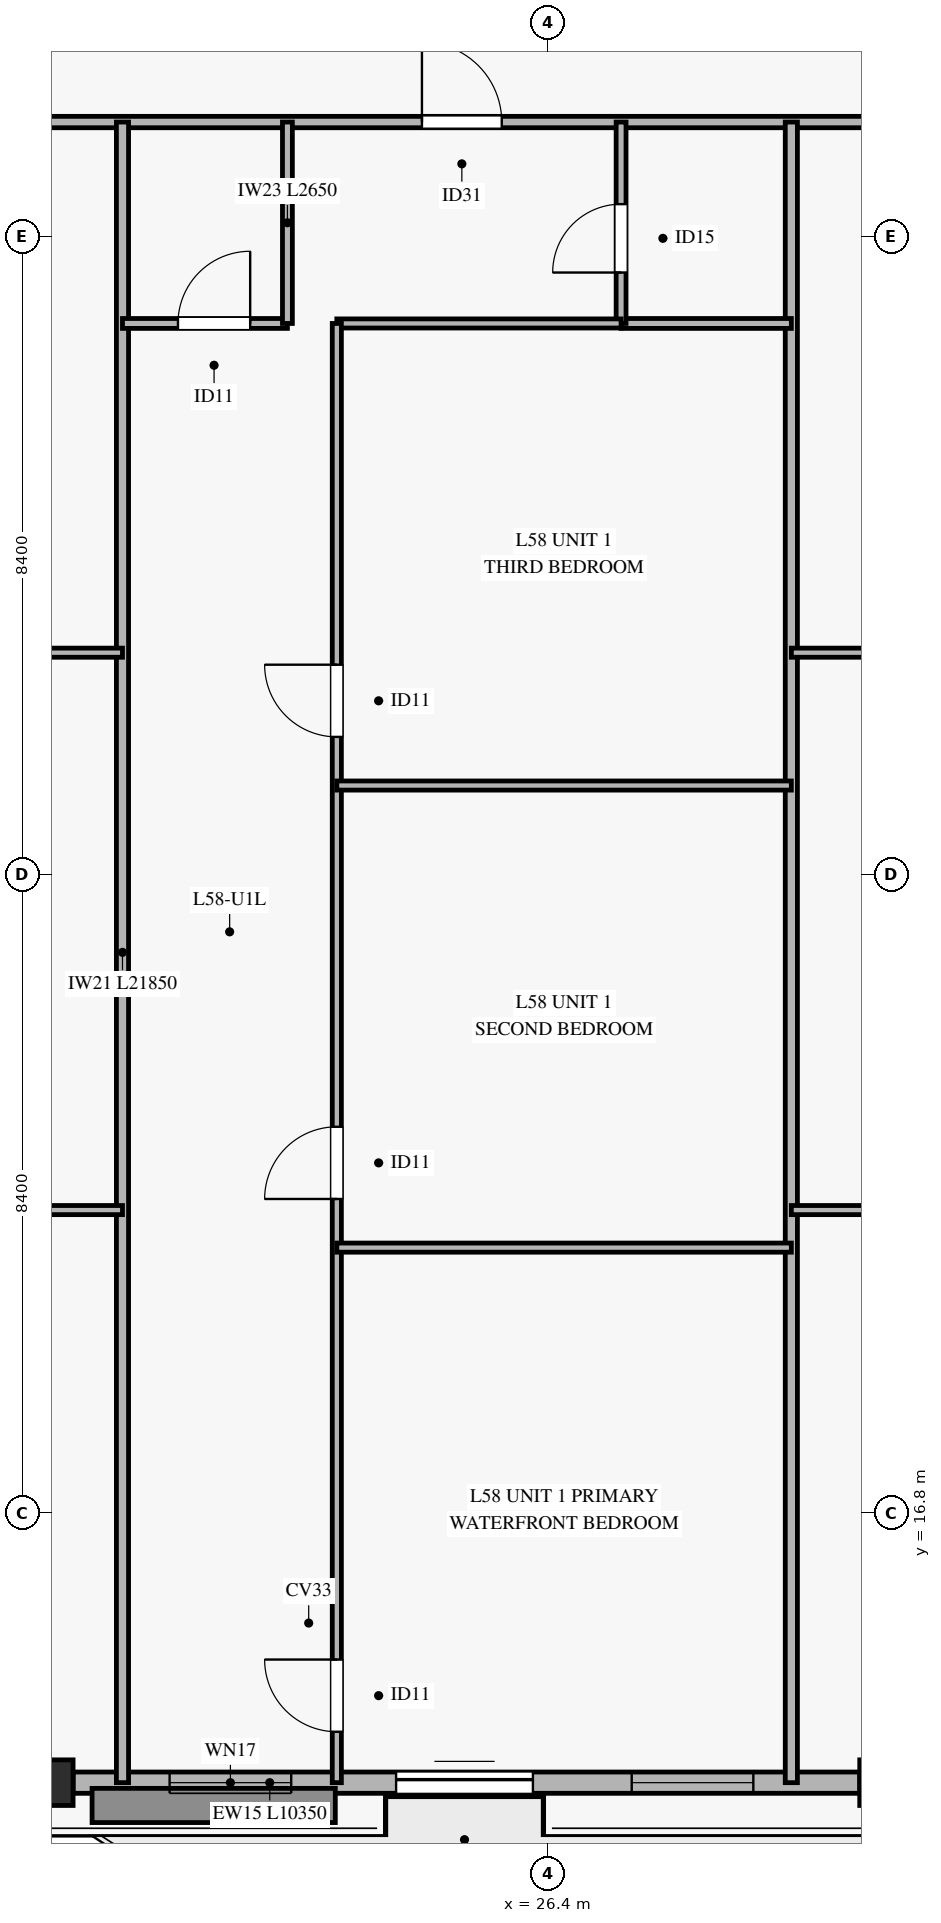
"""IFC4 building model, lengths in metres.
Left out: names, types, materials, properties, quantities, classifications, styles, units other than length and angle.
Written with IfcOpenShell. Run it as: python <this file> out.ifc"""

import sys

from ifc_helpers import new_model, si_unit, direction, frame, frame_2d, origin, origin_2d, place, context, subcontext, project, spatial, rectangle, hollow_rectangle, extrude, source, transform, mapped, element, fill, save


model = new_model("IFC4")
c1 = context("Model", 3, precision=1e-05, world=origin(), true_north=direction((0.0, 1.0)))
c2 = subcontext(c1, "Body", "Model", "MODEL_VIEW")
j1 = project(units=[si_unit("LENGTHUNIT", "METRE"), si_unit("PLANEANGLEUNIT", "RADIAN")], contexts=[c1])
p1 = place(None, origin())
s1 = spatial("IfcSite", under=j1, at=p1, CompositionType="ELEMENT")
p2 = place(p1, origin())
s2 = spatial("IfcBuilding", under=s1, at=p2, CompositionType="ELEMENT")
p3 = place(p2, frame((0.0, 0.0, 230.4)))
s3 = spatial("IfcBuildingStorey", under=s2, at=p3, CompositionType="ELEMENT", Elevation=230.4)
m1 = source(origin(), c2, "Body", "SweptSolid", [
    extrude(hollow_rectangle(XDim=0.6, YDim=0.6, WallThickness=0.028, at=origin_2d()), origin(), (0.0, 0.0, 1.0), 3.185),
])
for number, where, z_axis, x_axis in (
    (1, (19.85, 13.25, 0.0), (0.0, 0.0, 1.0), (1.0, 0.0, 0.0)),
    (2, (30.8, 13.25, 0.0), (0.0, 0.0, 1.0), (1.0, 0.0, 0.0)),
):
    element("IfcColumn", number, at=place(p3, frame(where, z_axis=z_axis, x_axis=x_axis)), inside=s3, PredefinedType="COLUMN", context=c2, shape_type="MappedRepresentation", body=[
        mapped(m1, transform((0.0, 0.0, 0.0), x_axis=(1.0, 0.0, 0.0), y_axis=(0.0, 1.0, 0.0), z_axis=(0.0, 0.0, 1.0), scale=1.0)),
    ])
p4 = place(p3, frame((20.15, 13.25, 0.0), z_axis=(0.0, 0.0, 1.0), x_axis=(1.0, 0.0, 0.0)))
e3 = element("IfcWall", 3, at=p4, inside=s3, PredefinedType="SOLIDWALL", context=c2, shape_type="SweptSolid", body=[
    extrude(rectangle(XDim=10.35, YDim=0.28, at=frame_2d((5.175, 0.0))), origin(), (0.0, 0.0, 1.0), 2.815),
])
p5 = place(p4, frame((4.25, 0.0, 0.0)))
e4 = element("IfcOpeningElement", 4, at=p5, cuts=e3, PredefinedType="OPENING", context=c2, shape_type="SweptSolid", body=[
    extrude(rectangle(XDim=1.8, YDim=2.25, at=frame_2d((0.9, 1.125))), frame((0.0, 0.15, 0.0), z_axis=(0.0, -1.0, 0.0), x_axis=(1.0, 0.0, 0.0)), (0.0, 0.0, 1.0), 0.3),
])
p6 = place(p4, frame((1.27, 0.0, 0.45)))
e5 = element("IfcOpeningElement", 5, at=p6, cuts=e3, PredefinedType="OPENING", context=c2, shape_type="SweptSolid", body=[
    extrude(rectangle(XDim=1.6, YDim=2.0, at=frame_2d((0.8, 1.0))), frame((0.0, 0.15, 0.0), z_axis=(0.0, -1.0, 0.0), x_axis=(1.0, 0.0, 0.0)), (0.0, 0.0, 1.0), 0.3),
])
p7 = place(p4, frame((7.35, 0.0, 0.45)))
e6 = element("IfcOpeningElement", 6, at=p7, cuts=e3, PredefinedType="OPENING", context=c2, shape_type="SweptSolid", body=[
    extrude(rectangle(XDim=1.6, YDim=2.0, at=frame_2d((0.8, 1.0))), frame((0.0, 0.15, 0.0), z_axis=(0.0, -1.0, 0.0), x_axis=(1.0, 0.0, 0.0)), (0.0, 0.0, 1.0), 0.3),
])
p8 = place(p3, frame((7.533, 35.1, 0.0), z_axis=(0.0, 0.0, 1.0), x_axis=(1.0, 0.0, 0.0)))
e7 = element("IfcWall", 7, at=p8, inside=s3, PredefinedType="PARTITIONING", context=c2, shape_type="SweptSolid", body=[
    extrude(rectangle(XDim=55.334, YDim=0.15, at=frame_2d((27.667, 0.0))), origin(), (0.0, 0.0, 1.0), 2.37),
])
p9 = place(p8, frame((5.335, 0.0, 0.0)))
e8 = element("IfcOpeningElement", 8, at=p9, cuts=e7, PredefinedType="OPENING", context=c2, shape_type="SweptSolid", body=[
    extrude(rectangle(XDim=1.05, YDim=2.15, at=frame_2d((0.525, 1.075))), frame((0.0, 0.085, 0.0), z_axis=(0.0, -1.0, 0.0), x_axis=(1.0, 0.0, 0.0)), (0.0, 0.0, 1.0), 0.17),
])
p10 = place(p8, frame((17.207, 0.0, 0.0)))
e9 = element("IfcOpeningElement", 9, at=p10, cuts=e7, PredefinedType="OPENING", context=c2, shape_type="SweptSolid", body=[
    extrude(rectangle(XDim=1.05, YDim=2.15, at=frame_2d((0.525, 1.075))), frame((0.0, 0.085, 0.0), z_axis=(0.0, -1.0, 0.0), x_axis=(1.0, 0.0, 0.0)), (0.0, 0.0, 1.0), 0.17),
])
p11 = place(p8, frame((25.884, 0.0, 0.0)))
e10 = element("IfcOpeningElement", 10, at=p11, cuts=e7, PredefinedType="OPENING", context=c2, shape_type="SweptSolid", body=[
    extrude(rectangle(XDim=1.05, YDim=2.15, at=frame_2d((0.525, 1.075))), frame((0.0, 0.085, 0.0), z_axis=(0.0, -1.0, 0.0), x_axis=(1.0, 0.0, 0.0)), (0.0, 0.0, 1.0), 0.17),
])
p12 = place(p8, frame((35.712, 0.0, 0.0)))
e11 = element("IfcOpeningElement", 11, at=p12, cuts=e7, PredefinedType="OPENING", context=c2, shape_type="SweptSolid", body=[
    extrude(rectangle(XDim=1.05, YDim=2.15, at=frame_2d((0.525, 1.075))), frame((0.0, 0.085, 0.0), z_axis=(0.0, -1.0, 0.0), x_axis=(1.0, 0.0, 0.0)), (0.0, 0.0, 1.0), 0.17),
])
p13 = place(p8, frame((47.078, 0.0, 0.0)))
e12 = element("IfcOpeningElement", 12, at=p13, cuts=e7, PredefinedType="OPENING", context=c2, shape_type="SweptSolid", body=[
    extrude(rectangle(XDim=1.05, YDim=2.15, at=frame_2d((0.525, 1.075))), frame((0.0, 0.085, 0.0), z_axis=(0.0, -1.0, 0.0), x_axis=(1.0, 0.0, 0.0)), (0.0, 0.0, 1.0), 0.17),
])
for number, where, z_axis, x_axis in (
    (13, (20.8, 13.25, 0.0), (0.0, 0.0, 1.0), (0.0, 1.0, 0.0)),
    (14, (29.6, 13.25, 0.0), (0.0, 0.0, 1.0), (0.0, 1.0, 0.0)),
):
    element("IfcWall", number, at=place(p3, frame(where, z_axis=z_axis, x_axis=x_axis)), inside=s3, PredefinedType="PARTITIONING", context=c2, shape_type="SweptSolid", body=[
        extrude(rectangle(XDim=21.85, YDim=0.16, at=frame_2d((10.925, 0.0))), origin(), (0.0, 0.0, 1.0), 2.77),
    ])
p14 = place(p3, frame((7.533, 20.784, 0.0), z_axis=(0.0, 0.0, 1.0), x_axis=(1.0, 0.0, 0.0)))
e15 = element("IfcWall", 15, at=p14, inside=s3, PredefinedType="PARTITIONING", context=c2, shape_type="SweptSolid", body=[
    extrude(rectangle(XDim=13.267, YDim=0.12, at=frame_2d((6.634, 0.0))), origin(), (0.0, 0.0, 1.0), 2.37),
])
p15 = place(p14, frame((5.593, 0.0, 0.0)))
e16 = element("IfcOpeningElement", 16, at=p15, cuts=e15, PredefinedType="OPENING", context=c2, shape_type="SweptSolid", body=[
    extrude(rectangle(XDim=0.95, YDim=2.1, at=frame_2d((0.475, 1.05))), frame((0.0, 0.07, 0.0), z_axis=(0.0, -1.0, 0.0), x_axis=(1.0, 0.0, 0.0)), (0.0, 0.0, 1.0), 0.14),
])
p16 = place(p3, frame((7.533, 28.118, 0.0), z_axis=(0.0, 0.0, 1.0), x_axis=(1.0, 0.0, 0.0)))
e17 = element("IfcWall", 17, at=p16, inside=s3, PredefinedType="PARTITIONING", context=c2, shape_type="SweptSolid", body=[
    extrude(rectangle(XDim=13.267, YDim=0.12, at=frame_2d((6.634, 0.0))), origin(), (0.0, 0.0, 1.0), 2.37),
])
p17 = place(p16, frame((5.593, 0.0, 0.0)))
e18 = element("IfcOpeningElement", 18, at=p17, cuts=e17, PredefinedType="OPENING", context=c2, shape_type="SweptSolid", body=[
    extrude(rectangle(XDim=0.95, YDim=2.1, at=frame_2d((0.475, 1.05))), frame((0.0, 0.07, 0.0), z_axis=(0.0, -1.0, 0.0), x_axis=(1.0, 0.0, 0.0)), (0.0, 0.0, 1.0), 0.14),
])
p18 = place(p3, frame((20.8, 32.45, 0.0), z_axis=(0.0, 0.0, 1.0), x_axis=(1.0, 0.0, 0.0)))
e19 = element("IfcWall", 19, at=p18, inside=s3, PredefinedType="PARTITIONING", context=c2, shape_type="SweptSolid", body=[
    extrude(rectangle(XDim=2.17, YDim=0.13, at=frame_2d((1.085, 0.0))), origin(), (0.0, 0.0, 1.0), 2.77),
])
p19 = place(p18, frame((0.73, 0.0, 0.0)))
e20 = element("IfcOpeningElement", 20, at=p19, cuts=e19, PredefinedType="OPENING", context=c2, shape_type="SweptSolid", body=[
    extrude(rectangle(XDim=0.95, YDim=2.1, at=frame_2d((0.475, 1.05))), frame((0.0, 0.075, 0.0), z_axis=(0.0, -1.0, 0.0), x_axis=(1.0, 0.0, 0.0)), (0.0, 0.0, 1.0), 0.15),
])
p20 = place(p3, frame((22.97, 32.45, 0.0), z_axis=(0.0, 0.0, 1.0), x_axis=(0.0, 1.0, 0.0)))
e21 = element("IfcWall", 21, at=p20, inside=s3, PredefinedType="PARTITIONING", context=c2, shape_type="SweptSolid", body=[
    extrude(rectangle(XDim=2.65, YDim=0.13, at=frame_2d((1.325, 0.0))), origin(), (0.0, 0.0, 1.0), 2.77),
])
p21 = place(p3, frame((27.36, 32.45, 0.0), z_axis=(0.0, 0.0, 1.0), x_axis=(1.0, 0.0, 0.0)))
e22 = element("IfcWall", 22, at=p21, inside=s3, PredefinedType="PARTITIONING", context=c2, shape_type="SweptSolid", body=[
    extrude(rectangle(XDim=2.24, YDim=0.13, at=frame_2d((1.12, 0.0))), origin(), (0.0, 0.0, 1.0), 2.77),
])
p22 = place(p3, frame((27.36, 32.45, 0.0), z_axis=(0.0, 0.0, 1.0), x_axis=(0.0, 1.0, 0.0)))
e23 = element("IfcWall", 23, at=p22, inside=s3, PredefinedType="PARTITIONING", context=c2, shape_type="SweptSolid", body=[
    extrude(rectangle(XDim=2.65, YDim=0.13, at=frame_2d((1.325, 0.0))), origin(), (0.0, 0.0, 1.0), 2.77),
])
p23 = place(p22, frame((0.67, 0.0, 0.0)))
e24 = element("IfcOpeningElement", 24, at=p23, cuts=e23, PredefinedType="OPENING", context=c2, shape_type="SweptSolid", body=[
    extrude(rectangle(XDim=0.9, YDim=2.1, at=frame_2d((0.45, 1.05))), frame((0.0, 0.075, 0.0), z_axis=(0.0, -1.0, 0.0), x_axis=(1.0, 0.0, 0.0)), (0.0, 0.0, 1.0), 0.15),
])
p24 = place(p3, frame((23.62, 32.45, 0.0), z_axis=(0.0, 0.0, 1.0), x_axis=(1.0, 0.0, 0.0)))
e25 = element("IfcWall", 25, at=p24, inside=s3, PredefinedType="PARTITIONING", context=c2, shape_type="SweptSolid", body=[
    extrude(rectangle(XDim=3.74, YDim=0.12, at=frame_2d((1.87, 0.0))), origin(), (0.0, 0.0, 1.0), 2.77),
])
p25 = place(p3, frame((23.62, 13.25, 0.0), z_axis=(0.0, 0.0, 1.0), x_axis=(0.0, 1.0, 0.0)))
e26 = element("IfcWall", 26, at=p25, inside=s3, PredefinedType="PARTITIONING", context=c2, shape_type="SweptSolid", body=[
    extrude(rectangle(XDim=19.2, YDim=0.12, at=frame_2d((9.6, 0.0))), origin(), (0.0, 0.0, 1.0), 2.77),
])
p26 = place(p25, frame((0.67, 0.0, 0.0)))
e27 = element("IfcOpeningElement", 27, at=p26, cuts=e26, PredefinedType="OPENING", context=c2, shape_type="SweptSolid", body=[
    extrude(rectangle(XDim=0.95, YDim=2.1, at=frame_2d((0.475, 1.05))), frame((0.0, 0.07, 0.0), z_axis=(0.0, -1.0, 0.0), x_axis=(1.0, 0.0, 0.0)), (0.0, 0.0, 1.0), 0.14),
])
p27 = place(p25, frame((7.68, 0.0, 0.0)))
e28 = element("IfcOpeningElement", 28, at=p27, cuts=e26, PredefinedType="OPENING", context=c2, shape_type="SweptSolid", body=[
    extrude(rectangle(XDim=0.95, YDim=2.1, at=frame_2d((0.475, 1.05))), frame((0.0, 0.07, 0.0), z_axis=(0.0, -1.0, 0.0), x_axis=(1.0, 0.0, 0.0)), (0.0, 0.0, 1.0), 0.14),
])
p28 = place(p25, frame((13.76, 0.0, 0.0)))
e29 = element("IfcOpeningElement", 29, at=p28, cuts=e26, PredefinedType="OPENING", context=c2, shape_type="SweptSolid", body=[
    extrude(rectangle(XDim=0.95, YDim=2.1, at=frame_2d((0.475, 1.05))), frame((0.0, 0.07, 0.0), z_axis=(0.0, -1.0, 0.0), x_axis=(1.0, 0.0, 0.0)), (0.0, 0.0, 1.0), 0.14),
])
for number, where, z_axis, x_axis in (
    (30, (23.62, 20.29, 0.0), (0.0, 0.0, 1.0), (1.0, 0.0, 0.0)),
    (31, (23.62, 26.37, 0.0), (0.0, 0.0, 1.0), (1.0, 0.0, 0.0)),
):
    element("IfcWall", number, at=place(p3, frame(where, z_axis=z_axis, x_axis=x_axis)), inside=s3, PredefinedType="PARTITIONING", context=c2, shape_type="SweptSolid", body=[
        extrude(rectangle(XDim=5.98, YDim=0.12, at=frame_2d((2.99, 0.0))), origin(), (0.0, 0.0, 1.0), 3.185),
    ])
p29 = place(p3, frame((29.6, 20.784, 0.0), z_axis=(0.0, 0.0, 1.0), x_axis=(1.0, 0.0, 0.0)))
e32 = element("IfcWall", 32, at=p29, inside=s3, PredefinedType="PARTITIONING", context=c2, shape_type="SweptSolid", body=[
    extrude(rectangle(XDim=9.6, YDim=0.12, at=frame_2d((4.8, 0.0))), origin(), (0.0, 0.0, 1.0), 2.37),
])
p30 = place(p29, frame((4.006, 0.0, 0.0)))
e33 = element("IfcOpeningElement", 33, at=p30, cuts=e32, PredefinedType="OPENING", context=c2, shape_type="SweptSolid", body=[
    extrude(rectangle(XDim=0.95, YDim=2.1, at=frame_2d((0.475, 1.05))), frame((0.0, 0.07, 0.0), z_axis=(0.0, -1.0, 0.0), x_axis=(1.0, 0.0, 0.0)), (0.0, 0.0, 1.0), 0.14),
])
p31 = place(p3, frame((29.6, 28.118, 0.0), z_axis=(0.0, 0.0, 1.0), x_axis=(1.0, 0.0, 0.0)))
e34 = element("IfcWall", 34, at=p31, inside=s3, PredefinedType="PARTITIONING", context=c2, shape_type="SweptSolid", body=[
    extrude(rectangle(XDim=9.6, YDim=0.12, at=frame_2d((4.8, 0.0))), origin(), (0.0, 0.0, 1.0), 2.37),
])
p32 = place(p31, frame((4.006, 0.0, 0.0)))
e35 = element("IfcOpeningElement", 35, at=p32, cuts=e34, PredefinedType="OPENING", context=c2, shape_type="SweptSolid", body=[
    extrude(rectangle(XDim=0.95, YDim=2.1, at=frame_2d((0.475, 1.05))), frame((0.0, 0.07, 0.0), z_axis=(0.0, -1.0, 0.0), x_axis=(1.0, 0.0, 0.0)), (0.0, 0.0, 1.0), 0.14),
])
m2 = source(origin(), c2, "Body", "SweptSolid", [
    extrude(rectangle(XDim=1.8, YDim=2.25, at=frame_2d((0.9, 1.125))), frame((0.0, 0.025, 0.0), z_axis=(0.0, -1.0, 0.0), x_axis=(1.0, 0.0, 0.0)), (0.0, 0.0, 1.0), 0.05),
])
p33 = place(p5, origin())
e36 = element("IfcDoor", 36, at=p33, inside=s3, OperationType="SLIDING_TO_LEFT", PredefinedType="DOOR", context=c2, shape_type="MappedRepresentation", body=[
    mapped(m2, transform((0.0, 0.0, 0.0), x_axis=(1.0, 0.0, 0.0), y_axis=(0.0, 1.0, 0.0), z_axis=(0.0, 0.0, 1.0), scale=1.0)),
])
fill(e4, e36)
m3 = source(origin(), c2, "Body", "SweptSolid", [
    extrude(rectangle(XDim=1.6, YDim=2.0, at=frame_2d((0.8, 1.0))), frame((0.0, 0.03, 0.0), z_axis=(0.0, -1.0, 0.0), x_axis=(1.0, 0.0, 0.0)), (0.0, 0.0, 1.0), 0.06),
])
p34 = place(p6, origin())
e37 = element("IfcWindow", 37, at=p34, inside=s3, PartitioningType="SINGLE_PANEL", PredefinedType="WINDOW", context=c2, shape_type="MappedRepresentation", body=[
    mapped(m3, transform((0.0, 0.0, 0.0), x_axis=(1.0, 0.0, 0.0), y_axis=(0.0, 1.0, 0.0), z_axis=(0.0, 0.0, 1.0), scale=1.0)),
])
fill(e5, e37)
p35 = place(p7, origin())
e38 = element("IfcWindow", 38, at=p35, inside=s3, PartitioningType="SINGLE_PANEL", PredefinedType="WINDOW", context=c2, shape_type="MappedRepresentation", body=[
    mapped(m3, transform((0.0, 0.0, 0.0), x_axis=(1.0, 0.0, 0.0), y_axis=(0.0, 1.0, 0.0), z_axis=(0.0, 0.0, 1.0), scale=1.0)),
])
fill(e6, e38)
m4 = source(origin(), c2, "Body", "SweptSolid", [
    extrude(rectangle(XDim=1.05, YDim=2.15, at=frame_2d((0.525, 1.075))), frame((0.0, 0.025, 0.0), z_axis=(0.0, -1.0, 0.0), x_axis=(1.0, 0.0, 0.0)), (0.0, 0.0, 1.0), 0.05),
])
p36 = place(p10, origin())
e39 = element("IfcDoor", 39, at=p36, inside=s3, OperationType="SINGLE_SWING_LEFT", PredefinedType="DOOR", context=c2, shape_type="MappedRepresentation", body=[
    mapped(m4, transform((0.0, 0.0, 0.0), x_axis=(1.0, 0.0, 0.0), y_axis=(0.0, 1.0, 0.0), z_axis=(0.0, 0.0, 1.0), scale=1.0)),
])
fill(e9, e39)
m5 = source(origin(), c2, "Body", "SweptSolid", [
    extrude(rectangle(XDim=0.95, YDim=2.1, at=frame_2d((0.475, 1.05))), frame((0.0, 0.025, 0.0), z_axis=(0.0, -1.0, 0.0), x_axis=(1.0, 0.0, 0.0)), (0.0, 0.0, 1.0), 0.05),
])
p37 = place(p19, origin())
e40 = element("IfcDoor", 40, at=p37, inside=s3, OperationType="SINGLE_SWING_RIGHT", PredefinedType="DOOR", context=c2, shape_type="MappedRepresentation", body=[
    mapped(m5, transform((0.0, 0.0, 0.0), x_axis=(1.0, 0.0, 0.0), y_axis=(0.0, 1.0, 0.0), z_axis=(0.0, 0.0, 1.0), scale=1.0)),
])
fill(e20, e40)
m6 = source(origin(), c2, "Body", "SweptSolid", [
    extrude(rectangle(XDim=0.9, YDim=2.1, at=frame_2d((0.45, 1.05))), frame((0.0, 0.025, 0.0), z_axis=(0.0, -1.0, 0.0), x_axis=(1.0, 0.0, 0.0)), (0.0, 0.0, 1.0), 0.05),
])
p38 = place(p23, origin())
e41 = element("IfcDoor", 41, at=p38, inside=s3, OperationType="SINGLE_SWING_LEFT", PredefinedType="DOOR", context=c2, shape_type="MappedRepresentation", body=[
    mapped(m6, transform((0.0, 0.0, 0.0), x_axis=(1.0, 0.0, 0.0), y_axis=(0.0, 1.0, 0.0), z_axis=(0.0, 0.0, 1.0), scale=1.0)),
])
fill(e24, e41)
p39 = place(p26, origin())
e42 = element("IfcDoor", 42, at=p39, inside=s3, OperationType="SINGLE_SWING_RIGHT", PredefinedType="DOOR", context=c2, shape_type="MappedRepresentation", body=[
    mapped(m5, transform((0.0, 0.0, 0.0), x_axis=(1.0, 0.0, 0.0), y_axis=(0.0, 1.0, 0.0), z_axis=(0.0, 0.0, 1.0), scale=1.0)),
])
fill(e27, e42)
p40 = place(p27, origin())
e43 = element("IfcDoor", 43, at=p40, inside=s3, OperationType="SINGLE_SWING_LEFT", PredefinedType="DOOR", context=c2, shape_type="MappedRepresentation", body=[
    mapped(m5, transform((0.0, 0.0, 0.0), x_axis=(1.0, 0.0, 0.0), y_axis=(0.0, 1.0, 0.0), z_axis=(0.0, 0.0, 1.0), scale=1.0)),
])
fill(e28, e43)
p41 = place(p28, origin())
e44 = element("IfcDoor", 44, at=p41, inside=s3, OperationType="SINGLE_SWING_RIGHT", PredefinedType="DOOR", context=c2, shape_type="MappedRepresentation", body=[
    mapped(m5, transform((0.0, 0.0, 0.0), x_axis=(1.0, 0.0, 0.0), y_axis=(0.0, 1.0, 0.0), z_axis=(0.0, 0.0, 1.0), scale=1.0)),
])
fill(e29, e44)
save(model, sys.argv[1])
